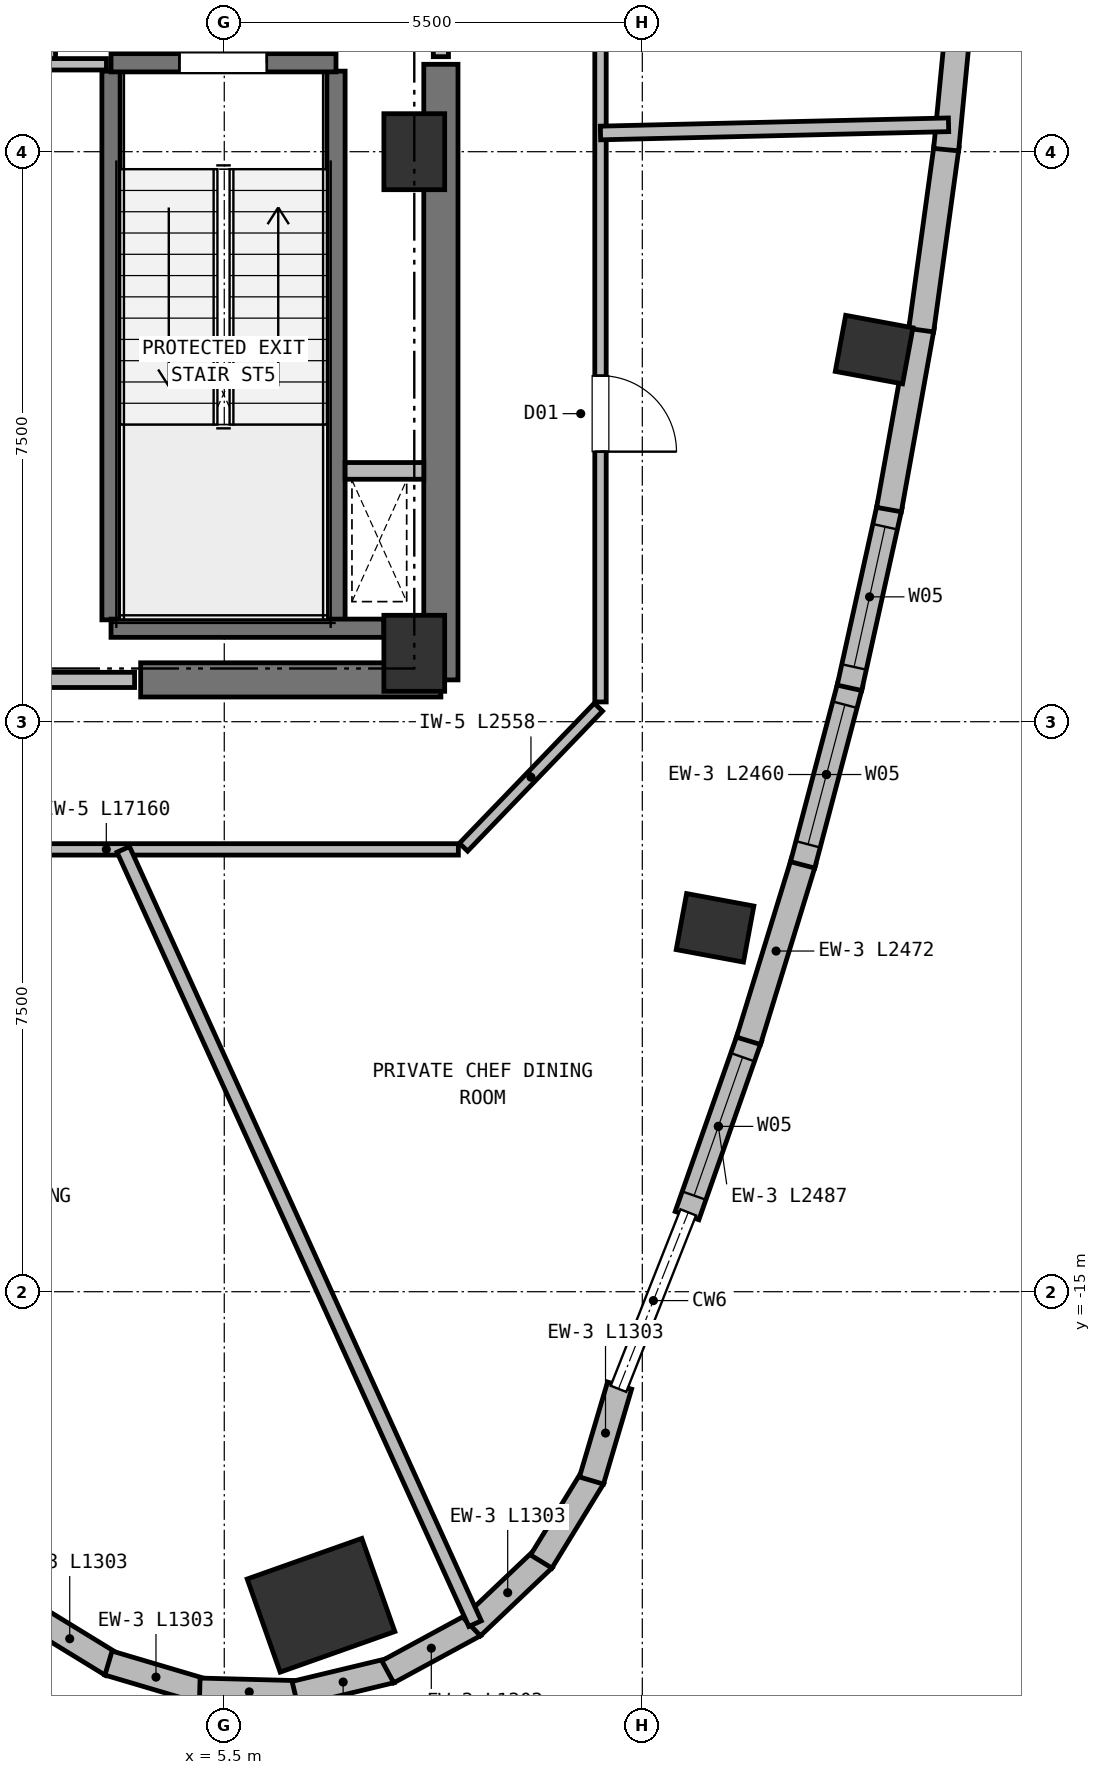
"""IFC4 building model, lengths in metres.
Left out: names, types, materials, properties, quantities, classifications, styles, units other than length and angle.
Written with IfcOpenShell. Run it as: python <this file> out.ifc"""

import sys

from ifc_helpers import new_model, si_unit, direction, frame, frame_2d, origin, origin_2d, place, context, subcontext, project, spatial, rectangle, extrude, element, fill, save


model = new_model("IFC4")
c1 = context("Model", 3, precision=1e-05, world=origin(), true_north=direction((0.0, 1.0)))
c2 = subcontext(c1, "Body", "Model", "MODEL_VIEW")
j1 = project(units=[si_unit("LENGTHUNIT", "METRE"), si_unit("PLANEANGLEUNIT", "RADIAN")], contexts=[c1])
p1 = place(None, origin())
s1 = spatial("IfcSite", under=j1, at=p1, CompositionType="ELEMENT")
p2 = place(p1, origin())
s2 = spatial("IfcBuilding", under=s1, at=p2, CompositionType="ELEMENT")
p3 = place(p2, frame((0.0, 0.0, 272.8)))
s3 = spatial("IfcBuildingStorey", under=s2, at=p3, CompositionType="ELEMENT", Elevation=272.8)
for number, where, z_axis, x_axis in (
    (1, (8.0, -6.6, 0.0), (0.0, 0.0, 1.0), (1.0, 0.0, 0.0)),
    (2, (8.0, 0.0, 0.0), (0.0, 0.0, 1.0), (1.0, 0.0, 0.0)),
):
    element("IfcColumn", number, at=place(p3, frame(where, z_axis=z_axis, x_axis=x_axis)), inside=s3, PredefinedType="COLUMN", context=c2, shape_type="SweptSolid", body=[
        extrude(rectangle(XDim=0.8, YDim=1.0, at=origin_2d()), origin(), (0.0, 0.0, 1.0), 4.4),
    ])
p4 = place(p3, frame((4.4, -6.95, 0.0), z_axis=(0.0, 0.0, 1.0), x_axis=(1.0, 0.0, 0.0)))
e3 = element("IfcWall", 3, at=p4, inside=s3, PredefinedType="SHEAR", context=c2, shape_type="SweptSolid", body=[
    extrude(rectangle(XDim=3.95, YDim=0.45, at=frame_2d((1.975, 0.0))), origin(), (0.0, 0.0, 1.0), 4.15),
])
p5 = place(p3, frame((8.35, -6.95, 0.0), z_axis=(0.0, 0.0, 1.0), x_axis=(0.0, 1.0, 0.0)))
e4 = element("IfcWall", 4, at=p5, inside=s3, PredefinedType="SHEAR", context=c2, shape_type="SweptSolid", body=[
    extrude(rectangle(XDim=8.1, YDim=0.45, at=frame_2d((4.05, 0.0))), origin(), (0.0, 0.0, 1.0), 4.15),
])
p6 = place(p3, frame((6.773, -19.126, 0.0), z_axis=(0.0, 0.0, 1.0), x_axis=(-0.333806859234, 0.942641491092, 0.0)))
e5 = element("IfcColumn", 5, at=p6, inside=s3, PredefinedType="COLUMN", context=c2, shape_type="SweptSolid", body=[
    extrude(rectangle(XDim=1.3, YDim=1.6, at=origin_2d()), origin(), (0.0, 0.0, 1.0), 4.4),
])
for number, where, z_axis, x_axis in (
    (6, (11.957, -10.212, 0.0), (0.0, 0.0, 1.0), (0.182, 0.983, 0.0)),
    (7, (14.05, -2.604, 0.0), (0.0, 0.0, 1.0), (0.182, 0.983, 0.0)),
):
    element("IfcColumn", number, at=place(p3, frame(where, z_axis=z_axis, x_axis=x_axis)), inside=s3, PredefinedType="COLUMN", context=c2, shape_type="SweptSolid", body=[
        extrude(rectangle(XDim=0.75, YDim=0.9, at=origin_2d()), origin(), (0.0, 0.0, 1.0), 4.4),
    ])
for number, where, z_axis, x_axis in (
    (8, (4.022, -19.906, 0.0), (0.0, 0.0, 1.0), (-0.853, 0.523, 0.0)),
    (9, (5.226, -20.256, 0.0), (0.0, 0.0, 1.0), (-0.959, 0.284, 0.0)),
):
    element("IfcWall", number, at=place(p3, frame(where, z_axis=z_axis, x_axis=x_axis)), inside=s3, PredefinedType="SOLIDWALL", context=c2, shape_type="SweptSolid", body=[
        extrude(rectangle(XDim=1.303, YDim=0.33, at=frame_2d((0.652, 0.0))), origin(), (0.0, 0.0, 1.0), 4.15),
    ])
for number, where, z_axis, x_axis in (
    (10, (6.48, -20.283, 0.0), (0.0, 0.0, 1.0), (-1.0, 0.026, 0.0)),
    (11, (7.698, -19.984, 0.0), (0.0, 0.0, 1.0), (-0.972, -0.233, 0.0)),
    (12, (8.796, -19.38, 0.0), (0.0, 0.0, 1.0), (-0.879, -0.477, 0.0)),
):
    element("IfcWall", number, at=place(p3, frame(where, z_axis=z_axis, x_axis=x_axis)), inside=s3, PredefinedType="SOLIDWALL", context=c2, shape_type="SweptSolid", body=[
        extrude(rectangle(XDim=1.303, YDim=0.33, at=frame_2d((0.651, 0.0))), origin(), (0.0, 0.0, 1.0), 4.15),
    ])
p7 = place(p3, frame((9.701, -18.512, 0.0), z_axis=(0.0, 0.0, 1.0), x_axis=(-0.725415712612, -0.688311008118, 0.0)))
e13 = element("IfcWall", 13, at=p7, inside=s3, PredefinedType="SOLIDWALL", context=c2, shape_type="SweptSolid", body=[
    extrude(rectangle(XDim=1.303, YDim=0.33, at=frame_2d((0.651, 0.0))), origin(), (0.0, 0.0, 1.0), 4.15),
])
p8 = place(p3, frame((10.351, -17.439, 0.0), z_axis=(0.0, 0.0, 1.0), x_axis=(-0.522601602676, -0.852577014047, 0.0)))
e14 = element("IfcWall", 14, at=p8, inside=s3, PredefinedType="SOLIDWALL", context=c2, shape_type="SweptSolid", body=[
    extrude(rectangle(XDim=1.303, YDim=0.33, at=frame_2d((0.651, 0.0))), origin(), (0.0, 0.0, 1.0), 4.15),
])
p9 = place(p3, frame((10.701, -16.235, 0.0), z_axis=(0.0, 0.0, 1.0), x_axis=(-0.284011785169, -0.958820789243, 0.0)))
e15 = element("IfcWall", 15, at=p9, inside=s3, PredefinedType="SOLIDWALL", context=c2, shape_type="SweptSolid", body=[
    extrude(rectangle(XDim=1.303, YDim=0.33, at=frame_2d((0.652, 0.0))), origin(), (0.0, 0.0, 1.0), 4.15),
])
p10 = place(p3, frame((12.413, -11.651, 0.0), z_axis=(0.0, 0.0, 1.0), x_axis=(-0.331176640599, -0.94356877477, 0.0)))
e16 = element("IfcWall", 16, at=p10, inside=s3, PredefinedType="SOLIDWALL", context=c2, shape_type="SweptSolid", body=[
    extrude(rectangle(XDim=2.487, YDim=0.33, at=frame_2d((1.244, 0.0))), origin(), (0.0, 0.0, 1.0), 4.15),
])
p11 = place(p10, frame((0.279, 0.0, 0.72)))
e17 = element("IfcOpeningElement", 17, at=p11, cuts=e16, PredefinedType="OPENING", context=c2, shape_type="SweptSolid", body=[
    extrude(rectangle(XDim=1.93, YDim=2.15, at=frame_2d((0.965, 1.075))), frame((0.0, 0.175, 0.0), z_axis=(0.0, -1.0, 0.0), x_axis=(1.0, 0.0, 0.0)), (0.0, 0.0, 1.0), 0.35),
])
p12 = place(p3, frame((13.123, -9.336, 0.0), z_axis=(0.0, 0.0, 1.0), x_axis=(-0.293558293962, -0.955941173946, 0.0)))
e18 = element("IfcWall", 18, at=p12, inside=s3, PredefinedType="SOLIDWALL", context=c2, shape_type="SweptSolid", body=[
    extrude(rectangle(XDim=2.472, YDim=0.33, at=frame_2d((1.236, 0.0))), origin(), (0.0, 0.0, 1.0), 4.15),
])
p13 = place(p3, frame((13.737, -7.006, 0.0), z_axis=(0.0, 0.0, 1.0), x_axis=(-0.255240594745, -0.966877571771, 0.0)))
e19 = element("IfcWall", 19, at=p13, inside=s3, PredefinedType="SOLIDWALL", context=c2, shape_type="SweptSolid", body=[
    extrude(rectangle(XDim=2.46, YDim=0.33, at=frame_2d((1.23, 0.0))), origin(), (0.0, 0.0, 1.0), 4.15),
])
p14 = place(p13, frame((0.28, 0.0, 0.72)))
e20 = element("IfcOpeningElement", 20, at=p14, cuts=e19, PredefinedType="OPENING", context=c2, shape_type="SweptSolid", body=[
    extrude(rectangle(XDim=1.9, YDim=2.15, at=frame_2d((0.95, 1.075))), frame((0.0, 0.175, 0.0), z_axis=(0.0, -1.0, 0.0), x_axis=(1.0, 0.0, 0.0)), (0.0, 0.0, 1.0), 0.35),
])
p15 = place(p3, frame((14.255, -4.66, 0.0), z_axis=(0.0, 0.0, 1.0), x_axis=(-0.216160793087, -0.976357778446, 0.0)))
e21 = element("IfcWall", 21, at=p15, inside=s3, PredefinedType="SOLIDWALL", context=c2, shape_type="SweptSolid", body=[
    extrude(rectangle(XDim=2.452, YDim=0.33, at=frame_2d((1.226, 0.0))), origin(), (0.0, 0.0, 1.0), 4.15),
])
p16 = place(p15, frame((0.281, 0.0, 0.72)))
e22 = element("IfcOpeningElement", 22, at=p16, cuts=e21, PredefinedType="OPENING", context=c2, shape_type="SweptSolid", body=[
    extrude(rectangle(XDim=1.89, YDim=2.15, at=frame_2d((0.945, 1.075))), frame((0.0, 0.175, 0.0), z_axis=(0.0, -1.0, 0.0), x_axis=(1.0, 0.0, 0.0)), (0.0, 0.0, 1.0), 0.35),
])
p17 = place(p3, frame((14.677, -2.299, 0.0), z_axis=(0.0, 0.0, 1.0), x_axis=(-0.176418802695, -0.984315196497, 0.0)))
e23 = element("IfcWall", 23, at=p17, inside=s3, PredefinedType="SOLIDWALL", context=c2, shape_type="SweptSolid", body=[
    extrude(rectangle(XDim=2.448, YDim=0.33, at=frame_2d((1.224, 0.0))), origin(), (0.0, 0.0, 1.0), 4.15),
])
p18 = place(p3, frame((15.003, 0.077, 0.0), z_axis=(0.0, 0.0, 1.0), x_axis=(-0.136310087879, -0.990666220249, 0.0)))
e24 = element("IfcWall", 24, at=p18, inside=s3, PredefinedType="SOLIDWALL", context=c2, shape_type="SweptSolid", body=[
    extrude(rectangle(XDim=2.448, YDim=0.33, at=frame_2d((1.224, 0.0))), origin(), (0.0, 0.0, 1.0), 4.15),
])
p19 = place(p3, frame((15.233, 2.468, 0.0), z_axis=(0.0, 0.0, 1.0), x_axis=(-0.096171472172, -0.995364781344, 0.0)))
e25 = element("IfcWall", 25, at=p19, inside=s3, PredefinedType="SOLIDWALL", context=c2, shape_type="SweptSolid", body=[
    extrude(rectangle(XDim=2.452, YDim=0.33, at=frame_2d((1.226, 0.0))), origin(), (0.0, 0.0, 1.0), 4.15),
])
for number, where, z_axis, x_axis in (
    (26, (4.01, -6.16, 0.0), (0.0, 0.0, 1.0), (0.0, 1.0, 0.0)),
    (27, (6.97, -6.16, 0.0), (0.0, 0.0, 1.0), (0.0, 1.0, 0.0)),
):
    element("IfcWall", number, at=place(p3, frame(where, z_axis=z_axis, x_axis=x_axis)), inside=s3, PredefinedType="SHEAR", context=c2, shape_type="SweptSolid", body=[
        extrude(rectangle(XDim=7.22, YDim=0.24, at=frame_2d((3.61, 0.0))), origin(), (0.0, 0.0, 1.0), 4.15),
    ])
p20 = place(p3, frame((4.01, -6.27, 0.0), z_axis=(0.0, 0.0, 1.0), x_axis=(1.0, 0.0, 0.0)))
e28 = element("IfcWall", 28, at=p20, inside=s3, PredefinedType="SHEAR", context=c2, shape_type="SweptSolid", body=[
    extrude(rectangle(XDim=3.59, YDim=0.24, at=frame_2d((1.795, 0.0))), origin(), (0.0, 0.0, 1.0), 4.15),
])
p21 = place(p3, frame((4.01, 1.17, 0.0), z_axis=(0.0, 0.0, 1.0), x_axis=(1.0, 0.0, 0.0)))
e29 = element("IfcWall", 29, at=p21, inside=s3, PredefinedType="SHEAR", context=c2, shape_type="SweptSolid", body=[
    extrude(rectangle(XDim=2.96, YDim=0.24, at=frame_2d((1.48, 0.0))), origin(), (0.0, 0.0, 1.0), 4.15),
])
p22 = place(p21, frame((0.9, 0.0, 0.0)))
e30 = element("IfcOpeningElement", 30, at=p22, cuts=e29, PredefinedType="OPENING", context=c2, shape_type="SweptSolid", body=[
    extrude(rectangle(XDim=1.15, YDim=2.15, at=frame_2d((0.575, 1.075))), frame((0.0, 0.13, 0.0), z_axis=(0.0, -1.0, 0.0), x_axis=(1.0, 0.0, 0.0)), (0.0, 0.0, 1.0), 0.26),
])
p23 = place(p3, frame((7.09, -4.2, 0.0), z_axis=(0.0, 0.0, 1.0), x_axis=(1.0, 0.0, 0.0)))
e31 = element("IfcWall", 31, at=p23, inside=s3, PredefinedType="PARTITIONING", context=c2, shape_type="SweptSolid", body=[
    extrude(rectangle(XDim=1.035, YDim=0.22, at=frame_2d((0.518, 0.0))), origin(), (0.0, 0.0, 1.0), 4.15),
])
p24 = place(p3, frame((3.18, 1.15, 0.0), z_axis=(0.0, 0.0, 1.0), x_axis=(0.0, 1.0, 0.0)))
e32 = element("IfcWall", 32, at=p24, inside=s3, PredefinedType="PARTITIONING", context=c2, shape_type="SweptSolid", body=[
    extrude(rectangle(XDim=3.3, YDim=0.2, at=frame_2d((1.65, 0.0))), origin(), (0.0, 0.0, 1.0), 4.15),
])
p25 = place(p24, frame((1.08, 0.0, 0.0)))
e33 = element("IfcOpeningElement", 33, at=p25, cuts=e32, PredefinedType="OPENING", context=c2, shape_type="SweptSolid", body=[
    extrude(rectangle(XDim=1.15, YDim=2.15, at=frame_2d((0.575, 1.075))), frame((0.0, 0.11, 0.0), z_axis=(0.0, -1.0, 0.0), x_axis=(1.0, 0.0, 0.0)), (0.0, 0.0, 1.0), 0.22),
])
p26 = place(p3, frame((8.35, 1.25, 0.0), z_axis=(0.0, 0.0, 1.0), x_axis=(0.0, 1.0, 0.0)))
e34 = element("IfcWall", 34, at=p26, inside=s3, PredefinedType="PARTITIONING", context=c2, shape_type="SweptSolid", body=[
    extrude(rectangle(XDim=5.3, YDim=0.2, at=frame_2d((2.65, 0.0))), origin(), (0.0, 0.0, 1.0), 4.15),
])
p27 = place(p26, frame((0.95, 0.0, 0.0)))
e35 = element("IfcOpeningElement", 35, at=p27, cuts=e34, PredefinedType="OPENING", context=c2, shape_type="SweptSolid", body=[
    extrude(rectangle(XDim=1.15, YDim=2.15, at=frame_2d((0.575, 1.075))), frame((0.0, 0.11, 0.0), z_axis=(0.0, -1.0, 0.0), x_axis=(1.0, 0.0, 0.0)), (0.0, 0.0, 1.0), 0.22),
])
p28 = place(p3, frame((3.95, 1.15, 0.0), z_axis=(0.0, 0.0, 1.0), x_axis=(-1.0, 0.0, 0.0)))
e36 = element("IfcWall", 36, at=p28, inside=s3, PredefinedType="PARTITIONING", context=c2, shape_type="SweptSolid", body=[
    extrude(rectangle(XDim=7.9, YDim=0.15, at=frame_2d((3.95, 0.0))), origin(), (0.0, 0.0, 1.0), 4.15),
])
p29 = place(p28, frame((3.49, 0.0, 0.0)))
e37 = element("IfcOpeningElement", 37, at=p29, cuts=e36, PredefinedType="OPENING", context=c2, shape_type="SweptSolid", body=[
    extrude(rectangle(XDim=0.92, YDim=2.05, at=frame_2d((0.46, 1.025))), frame((0.0, 0.085, 0.0), z_axis=(0.0, -1.0, 0.0), x_axis=(1.0, 0.0, 0.0)), (0.0, 0.0, 1.0), 0.17),
])
p30 = place(p3, frame((-4.32, -6.95, 0.0), z_axis=(0.0, 0.0, 1.0), x_axis=(1.0, 0.0, 0.0)))
e38 = element("IfcWall", 38, at=p30, inside=s3, PredefinedType="PARTITIONING", context=c2, shape_type="SweptSolid", body=[
    extrude(rectangle(XDim=8.64, YDim=0.2, at=frame_2d((4.32, 0.0))), origin(), (0.0, 0.0, 1.0), 4.15),
])
p31 = place(p3, frame((8.58, -9.18, 0.0), z_axis=(0.0, 0.0, 1.0), x_axis=(-1.0, 0.0, 0.0)))
e39 = element("IfcWall", 39, at=p31, inside=s3, PredefinedType="PARTITIONING", context=c2, shape_type="SweptSolid", body=[
    extrude(rectangle(XDim=17.16, YDim=0.15, at=frame_2d((8.58, 0.0))), origin(), (0.0, 0.0, 1.0), 3.86),
])
p32 = place(p31, frame((9.364, 0.0, 0.0)))
e40 = element("IfcOpeningElement", 40, at=p32, cuts=e39, PredefinedType="OPENING", context=c2, shape_type="SweptSolid", body=[
    extrude(rectangle(XDim=1.0, YDim=2.15, at=frame_2d((0.5, 1.075))), frame((0.0, 0.085, 0.0), z_axis=(0.0, -1.0, 0.0), x_axis=(1.0, 0.0, 0.0)), (0.0, 0.0, 1.0), 0.17),
])
p33 = place(p3, frame((10.422, -7.309, 0.0), z_axis=(0.0, 0.0, 1.0), x_axis=(-0.693764562202, -0.720201869085, 0.0)))
e41 = element("IfcWall", 41, at=p33, inside=s3, PredefinedType="PARTITIONING", context=c2, shape_type="SweptSolid", body=[
    extrude(rectangle(XDim=2.558, YDim=0.15, at=frame_2d((1.279, 0.0))), origin(), (0.0, 0.0, 1.0), 4.15),
])
p34 = place(p3, frame((10.45, 8.65, 0.0), z_axis=(0.0, 0.0, 1.0), x_axis=(0.0, -1.0, 0.0)))
e42 = element("IfcWall", 42, at=p34, inside=s3, PredefinedType="PARTITIONING", context=c2, shape_type="SweptSolid", body=[
    extrude(rectangle(XDim=15.89, YDim=0.15, at=frame_2d((7.945, 0.0))), origin(), (0.0, 0.0, 1.0), 3.86),
])
p35 = place(p34, frame((11.597, 0.0, 0.0)))
e43 = element("IfcOpeningElement", 43, at=p35, cuts=e42, PredefinedType="OPENING", context=c2, shape_type="SweptSolid", body=[
    extrude(rectangle(XDim=1.0, YDim=2.15, at=frame_2d((0.5, 1.075))), frame((0.0, 0.085, 0.0), z_axis=(0.0, -1.0, 0.0), x_axis=(1.0, 0.0, 0.0)), (0.0, 0.0, 1.0), 0.17),
])
p36 = place(p34, frame((3.842, 0.0, 0.0)))
e44 = element("IfcOpeningElement", 44, at=p36, cuts=e42, PredefinedType="OPENING", context=c2, shape_type="SweptSolid", body=[
    extrude(rectangle(XDim=1.0, YDim=2.15, at=frame_2d((0.5, 1.075))), frame((0.0, 0.085, 0.0), z_axis=(0.0, -1.0, 0.0), x_axis=(1.0, 0.0, 0.0)), (0.0, 0.0, 1.0), 0.17),
])
p37 = place(p3, frame((4.171, -9.18, 0.0), z_axis=(0.0, 0.0, 1.0), x_axis=(0.413663216612, -0.910429977111, 0.0)))
e45 = element("IfcWall", 45, at=p37, inside=s3, PredefinedType="PARTITIONING", context=c2, shape_type="SweptSolid", body=[
    extrude(rectangle(XDim=11.19, YDim=0.18, at=frame_2d((5.595, 0.0))), origin(), (0.0, 0.0, 1.0), 4.15),
])
p38 = place(p3, frame((10.45, 0.246, 0.0), z_axis=(0.0, 0.0, 1.0), x_axis=(0.999722471899, 0.023557996086, 0.0)))
e46 = element("IfcWall", 46, at=p38, inside=s3, PredefinedType="PARTITIONING", context=c2, shape_type="SweptSolid", body=[
    extrude(rectangle(XDim=4.581, YDim=0.18, at=frame_2d((2.29, 0.0))), origin(), (0.0, 0.0, 1.0), 4.15),
])
p39 = place(p11, origin())
e47 = element("IfcWindow", 47, at=p39, inside=s3, PartitioningType="SINGLE_PANEL", PredefinedType="WINDOW", context=c2, shape_type="SweptSolid", body=[
    extrude(rectangle(XDim=1.93, YDim=2.15, at=frame_2d((0.965, 1.075))), frame((0.0, 0.03, 0.0), z_axis=(0.0, -1.0, 0.0), x_axis=(1.0, 0.0, 0.0)), (0.0, 0.0, 1.0), 0.06),
])
fill(e17, e47)
p40 = place(p14, origin())
e48 = element("IfcWindow", 48, at=p40, inside=s3, PartitioningType="SINGLE_PANEL", PredefinedType="WINDOW", context=c2, shape_type="SweptSolid", body=[
    extrude(rectangle(XDim=1.9, YDim=2.15, at=frame_2d((0.95, 1.075))), frame((0.0, 0.03, 0.0), z_axis=(0.0, -1.0, 0.0), x_axis=(1.0, 0.0, 0.0)), (0.0, 0.0, 1.0), 0.06),
])
fill(e20, e48)
p41 = place(p16, origin())
e49 = element("IfcWindow", 49, at=p41, inside=s3, PartitioningType="SINGLE_PANEL", PredefinedType="WINDOW", context=c2, shape_type="SweptSolid", body=[
    extrude(rectangle(XDim=1.89, YDim=2.15, at=frame_2d((0.945, 1.075))), frame((0.0, 0.03, 0.0), z_axis=(0.0, -1.0, 0.0), x_axis=(1.0, 0.0, 0.0)), (0.0, 0.0, 1.0), 0.06),
])
fill(e22, e49)
p42 = place(p22, origin())
e50 = element("IfcDoor", 50, at=p42, inside=s3, OperationType="SINGLE_SWING_RIGHT", PredefinedType="DOOR", context=c2, shape_type="SweptSolid", body=[
    extrude(rectangle(XDim=1.15, YDim=2.15, at=frame_2d((0.575, 1.075))), frame((0.0, 0.025, 0.0), z_axis=(0.0, -1.0, 0.0), x_axis=(1.0, 0.0, 0.0)), (0.0, 0.0, 1.0), 0.05),
])
fill(e30, e50)
p43 = place(p35, origin())
e51 = element("IfcDoor", 51, at=p43, inside=s3, OperationType="SINGLE_SWING_RIGHT", PredefinedType="DOOR", context=c2, shape_type="SweptSolid", body=[
    extrude(rectangle(XDim=1.0, YDim=2.15, at=frame_2d((0.5, 1.075))), frame((0.0, 0.025, 0.0), z_axis=(0.0, -1.0, 0.0), x_axis=(1.0, 0.0, 0.0)), (0.0, 0.0, 1.0), 0.05),
])
fill(e43, e51)
save(model, sys.argv[1])
